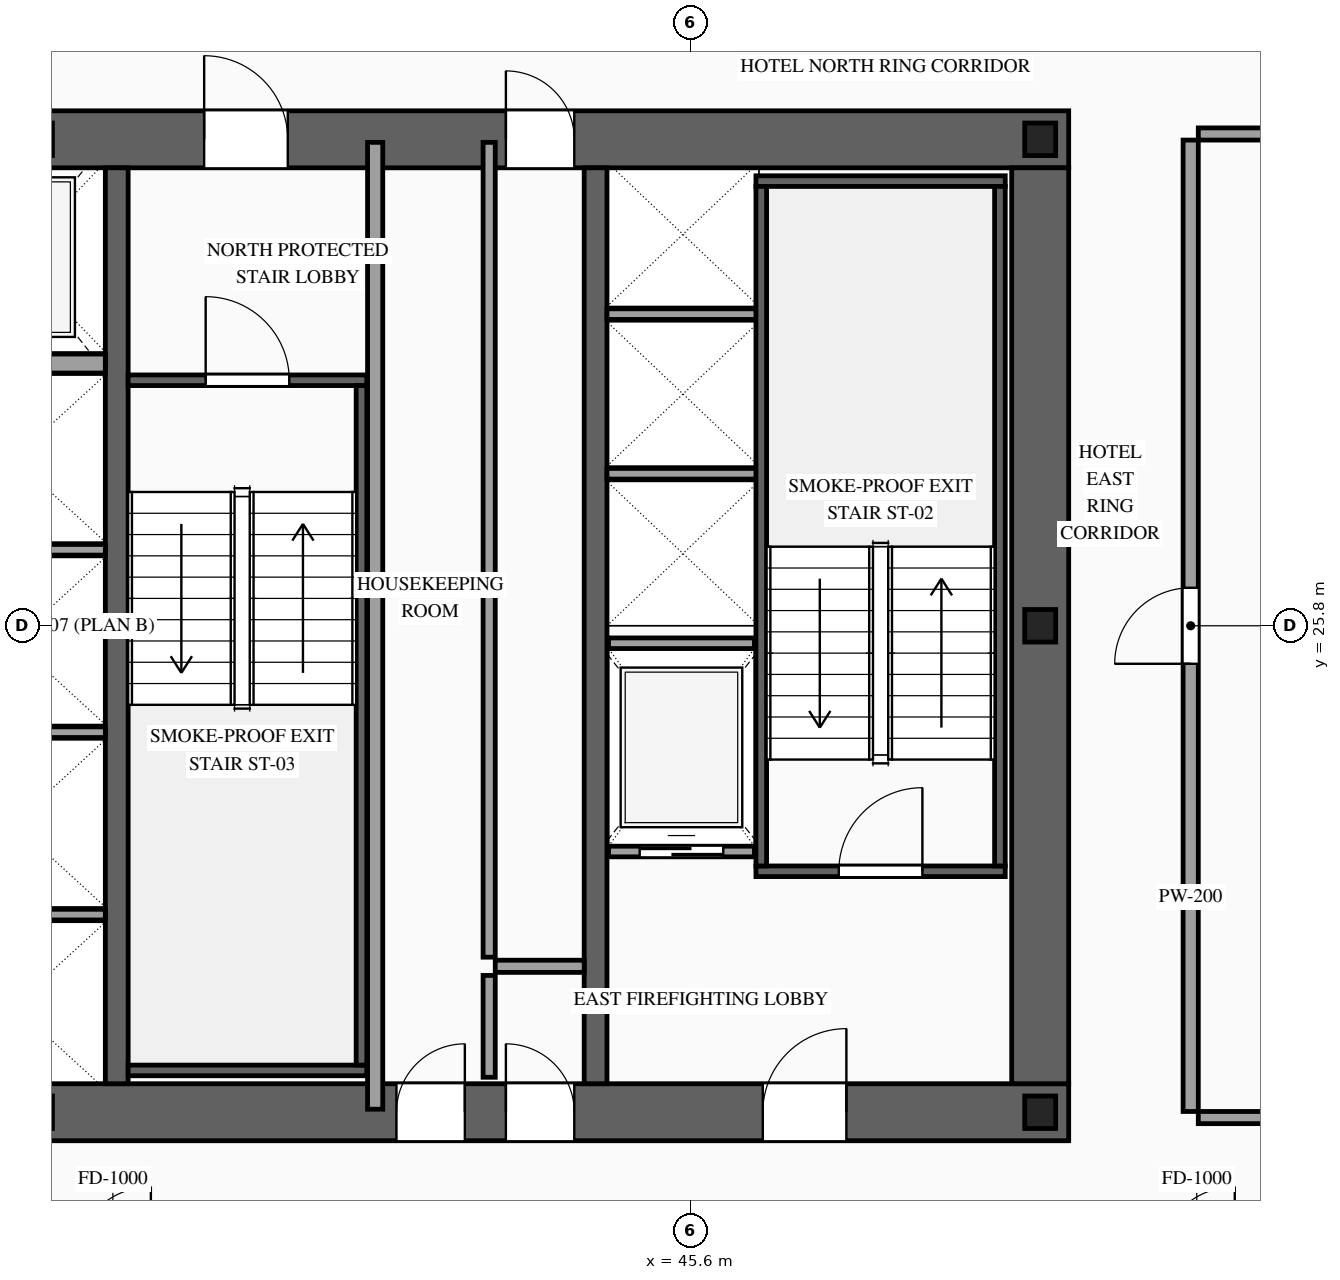
"""IFC4 building model, lengths in metres.
Left out: names, types, materials, properties, quantities, classifications, styles, units other than length and angle.
Written with IfcOpenShell. Run it as: python <this file> out.ifc"""

import sys

from ifc_helpers import new_model, si_unit, direction, frame, frame_2d, origin, origin_2d, place, context, subcontext, project, spatial, rectangle, i_section, extrude, source, transform, mapped, element, fill, save


model = new_model("IFC4")
c1 = context("Model", 3, precision=1e-05, world=origin(), true_north=direction((0.0, 1.0)))
c2 = subcontext(c1, "Body", "Model", "MODEL_VIEW")
j1 = project(units=[si_unit("LENGTHUNIT", "METRE"), si_unit("PLANEANGLEUNIT", "RADIAN")], contexts=[c1])
p1 = place(None, origin())
s1 = spatial("IfcSite", under=j1, at=p1, CompositionType="ELEMENT")
p2 = place(p1, origin())
s2 = spatial("IfcBuilding", under=s1, at=p2, CompositionType="ELEMENT")
p3 = place(p2, frame((0.0, 0.0, 108.2)))
s3 = spatial("IfcBuildingStorey", under=s2, at=p3, CompositionType="ELEMENT", Elevation=108.2)
p4 = place(p3, frame((23.425, 19.4, 0.0), z_axis=(0.0, 0.0, 1.0), x_axis=(1.0, 0.0, 0.0)))
e1 = element("IfcWall", 1, at=p4, inside=s3, PredefinedType="SHEAR", context=c2, shape_type="SweptSolid", body=[
    extrude(rectangle(XDim=27.15, YDim=0.75, at=frame_2d((13.575, 0.0))), origin(), (0.0, 0.0, 1.0), 3.6),
])
p5 = place(p4, frame((2.025, 0.0, 0.0)))
e2 = element("IfcOpeningElement", 2, at=p5, cuts=e1, PredefinedType="OPENING", context=c2, shape_type="SweptSolid", body=[
    extrude(rectangle(XDim=1.1, YDim=2.2, at=frame_2d((0.55, 1.1))), frame((0.0, 0.39, 0.0), z_axis=(0.0, -1.0, 0.0), x_axis=(1.0, 0.0, 0.0)), (0.0, 0.0, 1.0), 0.78),
])
p6 = place(p4, frame((9.925, 0.0, 0.0)))
e3 = element("IfcOpeningElement", 3, at=p6, cuts=e1, PredefinedType="OPENING", context=c2, shape_type="SweptSolid", body=[
    extrude(rectangle(XDim=1.1, YDim=2.2, at=frame_2d((0.55, 1.1))), frame((0.0, 0.39, 0.0), z_axis=(0.0, -1.0, 0.0), x_axis=(1.0, 0.0, 0.0)), (0.0, 0.0, 1.0), 0.78),
])
p7 = place(p4, frame((23.125, 0.0, 0.0)))
e4 = element("IfcOpeningElement", 4, at=p7, cuts=e1, PredefinedType="OPENING", context=c2, shape_type="SweptSolid", body=[
    extrude(rectangle(XDim=1.1, YDim=2.2, at=frame_2d((0.55, 1.1))), frame((0.0, 0.39, 0.0), z_axis=(0.0, -1.0, 0.0), x_axis=(1.0, 0.0, 0.0)), (0.0, 0.0, 1.0), 0.78),
])
p8 = place(p4, frame((19.745, 0.0, 0.0)))
e5 = element("IfcOpeningElement", 5, at=p8, cuts=e1, PredefinedType="OPENING", context=c2, shape_type="SweptSolid", body=[
    extrude(rectangle(XDim=0.9, YDim=2.15, at=frame_2d((0.45, 1.075))), frame((0.0, 0.39, 0.0), z_axis=(0.0, -1.0, 0.0), x_axis=(1.0, 0.0, 0.0)), (0.0, 0.0, 1.0), 0.78),
])
p9 = place(p4, frame((18.305, 0.0, 0.0)))
e6 = element("IfcOpeningElement", 6, at=p9, cuts=e1, PredefinedType="OPENING", context=c2, shape_type="SweptSolid", body=[
    extrude(rectangle(XDim=0.9, YDim=2.15, at=frame_2d((0.45, 1.075))), frame((0.0, 0.39, 0.0), z_axis=(0.0, -1.0, 0.0), x_axis=(1.0, 0.0, 0.0)), (0.0, 0.0, 1.0), 0.78),
])
p10 = place(p3, frame((23.425, 32.2, 0.0), z_axis=(0.0, 0.0, 1.0), x_axis=(1.0, 0.0, 0.0)))
e7 = element("IfcWall", 7, at=p10, inside=s3, PredefinedType="SHEAR", context=c2, shape_type="SweptSolid", body=[
    extrude(rectangle(XDim=27.15, YDim=0.75, at=frame_2d((13.575, 0.0))), origin(), (0.0, 0.0, 1.0), 3.6),
])
p11 = place(p10, frame((4.645, 0.0, 0.0)))
e8 = element("IfcOpeningElement", 8, at=p11, cuts=e7, PredefinedType="OPENING", context=c2, shape_type="SweptSolid", body=[
    extrude(rectangle(XDim=0.9, YDim=2.15, at=frame_2d((0.45, 1.075))), frame((0.0, 0.39, 0.0), z_axis=(0.0, -1.0, 0.0), x_axis=(1.0, 0.0, 0.0)), (0.0, 0.0, 1.0), 0.78),
])
p12 = place(p10, frame((9.925, 0.0, 0.0)))
e9 = element("IfcOpeningElement", 9, at=p12, cuts=e7, PredefinedType="OPENING", context=c2, shape_type="SweptSolid", body=[
    extrude(rectangle(XDim=1.1, YDim=2.2, at=frame_2d((0.55, 1.1))), frame((0.0, 0.39, 0.0), z_axis=(0.0, -1.0, 0.0), x_axis=(1.0, 0.0, 0.0)), (0.0, 0.0, 1.0), 0.78),
])
p13 = place(p10, frame((15.775, 0.0, 0.0)))
e10 = element("IfcOpeningElement", 10, at=p13, cuts=e7, PredefinedType="OPENING", context=c2, shape_type="SweptSolid", body=[
    extrude(rectangle(XDim=1.1, YDim=2.2, at=frame_2d((0.55, 1.1))), frame((0.0, 0.39, 0.0), z_axis=(0.0, -1.0, 0.0), x_axis=(1.0, 0.0, 0.0)), (0.0, 0.0, 1.0), 0.78),
])
p14 = place(p10, frame((19.745, 0.0, 0.0)))
e11 = element("IfcOpeningElement", 11, at=p14, cuts=e7, PredefinedType="OPENING", context=c2, shape_type="SweptSolid", body=[
    extrude(rectangle(XDim=0.9, YDim=2.15, at=frame_2d((0.45, 1.075))), frame((0.0, 0.39, 0.0), z_axis=(0.0, -1.0, 0.0), x_axis=(1.0, 0.0, 0.0)), (0.0, 0.0, 1.0), 0.78),
])
m1 = source(origin(), c2, "Body", "SweptSolid", [
    extrude(rectangle(XDim=12.05, YDim=0.75, at=frame_2d((6.025, 0.0))), origin(), (0.0, 0.0, 1.0), 3.6),
])
p15 = place(p3, frame((50.2, 19.775, 0.0), z_axis=(0.0, 0.0, 1.0), x_axis=(0.0, 1.0, 0.0)))
e12 = element("IfcWall", 12, at=p15, inside=s3, PredefinedType="SHEAR", context=c2, shape_type="MappedRepresentation", body=[
    mapped(m1, transform((0.0, 0.0, 0.0), scale=1.0)),
])
m2 = source(origin(), c2, "Body", "SweptSolid", [
    extrude(rectangle(XDim=12.05, YDim=0.3, at=frame_2d((6.025, 0.0))), origin(), (0.0, 0.0, 1.0), 3.6),
])
for number, where, z_axis, x_axis in (
    (13, (38.05, 19.775, 0.0), (0.0, 0.0, 1.0), (0.0, 1.0, 0.0)),
    (14, (44.35, 19.775, 0.0), (0.0, 0.0, 1.0), (0.0, 1.0, 0.0)),
):
    element("IfcWall", number, at=place(p3, frame(where, z_axis=z_axis, x_axis=x_axis)), inside=s3, PredefinedType="SOLIDWALL", context=c2, shape_type="MappedRepresentation", body=[
        mapped(m2, transform((0.0, 0.0, 0.0), scale=1.0)),
    ])
m3 = source(origin(), c2, "Body", "SweptSolid", [
    extrude(i_section(OverallWidth=0.407, OverallDepth=0.428, WebThickness=0.02, FlangeThickness=0.035, at=origin_2d()), origin(), (0.0, 0.0, 1.0), 3.6),
])
for number, where, z_axis, x_axis in (
    (15, (37.0, 19.4, 0.0), (0.0, 0.0, 1.0), (1.0, 0.0, 0.0)),
    (16, (50.2, 19.4, 0.0), (0.0, 0.0, 1.0), (1.0, 0.0, 0.0)),
    (17, (50.2, 25.8, 0.0), (0.0, 0.0, 1.0), (1.0, 0.0, 0.0)),
    (18, (37.0, 32.2, 0.0), (0.0, 0.0, 1.0), (1.0, 0.0, 0.0)),
    (19, (50.2, 32.2, 0.0), (0.0, 0.0, 1.0), (1.0, 0.0, 0.0)),
):
    element("IfcColumn", number, at=place(p3, frame(where, z_axis=z_axis, x_axis=x_axis)), inside=s3, PredefinedType="COLUMN", context=c2, shape_type="MappedRepresentation", body=[
        mapped(m3, transform((0.0, 0.0, 0.0), scale=1.0)),
    ])
p16 = place(p3, frame((44.52, 22.83, 0.0), z_axis=(0.0, 0.0, 1.0), x_axis=(1.0, 0.0, 0.0)))
e20 = element("IfcWall", 20, at=p16, inside=s3, PredefinedType="SOLIDWALL", context=c2, shape_type="SweptSolid", body=[
    extrude(rectangle(XDim=1.92, YDim=0.14, at=frame_2d((0.96, 0.0))), origin(), (0.0, 0.0, 1.0), 3.38),
])
p17 = place(p16, frame((0.41, 0.0, 0.0)))
e21 = element("IfcOpeningElement", 21, at=p17, cuts=e20, PredefinedType="OPENING", context=c2, shape_type="SweptSolid", body=[
    extrude(rectangle(XDim=1.1, YDim=2.2, at=frame_2d((0.55, 1.1))), frame((0.0, 0.085, 0.0), z_axis=(0.0, -1.0, 0.0), x_axis=(1.0, 0.0, 0.0)), (0.0, 0.0, 1.0), 0.17),
])
m4 = source(origin(), c2, "Body", "SweptSolid", [
    extrude(rectangle(XDim=1.92, YDim=0.14, at=frame_2d((0.96, 0.0))), origin(), (0.0, 0.0, 1.0), 3.38),
])
p18 = place(p3, frame((44.52, 25.57, 0.0), z_axis=(0.0, 0.0, 1.0), x_axis=(1.0, 0.0, 0.0)))
e22 = element("IfcWall", 22, at=p18, inside=s3, PredefinedType="SOLIDWALL", context=c2, shape_type="MappedRepresentation", body=[
    mapped(m4, transform((0.0, 0.0, 0.0), scale=1.0)),
])
m5 = source(origin(), c2, "Body", "SweptSolid", [
    extrude(rectangle(XDim=2.4, YDim=0.14, at=frame_2d((1.2, 0.0))), origin(), (0.0, 0.0, 1.0), 3.38),
])
for number, where, z_axis, x_axis in (
    (23, (35.5, 22.0, 0.0), (0.0, 0.0, 1.0), (1.0, 0.0, 0.0)),
    (24, (35.5, 24.4, 0.0), (0.0, 0.0, 1.0), (1.0, 0.0, 0.0)),
    (25, (35.5, 26.8, 0.0), (0.0, 0.0, 1.0), (1.0, 0.0, 0.0)),
):
    element("IfcWall", number, at=place(p3, frame(where, z_axis=z_axis, x_axis=x_axis)), inside=s3, PredefinedType="SOLIDWALL", context=c2, shape_type="MappedRepresentation", body=[
        mapped(m5, transform((0.0, 0.0, 0.0), scale=1.0)),
    ])
m6 = source(origin(), c2, "Body", "SweptSolid", [
    extrude(rectangle(XDim=2.4, YDim=0.25, at=frame_2d((1.2, 0.0))), origin(), (0.0, 0.0, 1.0), 3.38),
])
p19 = place(p3, frame((35.5, 29.25, 0.0), z_axis=(0.0, 0.0, 1.0), x_axis=(1.0, 0.0, 0.0)))
e26 = element("IfcWall", 26, at=p19, inside=s3, PredefinedType="SOLIDWALL", context=c2, shape_type="MappedRepresentation", body=[
    mapped(m6, transform((0.0, 0.0, 0.0), scale=1.0)),
])
m7 = source(origin(), c2, "Body", "SweptSolid", [
    extrude(rectangle(XDim=2.0, YDim=0.14, at=frame_2d((1.0, 0.0))), origin(), (0.0, 0.0, 1.0), 3.38),
])
for number, where, z_axis, x_axis in (
    (27, (44.5, 27.8, 0.0), (0.0, 0.0, 1.0), (1.0, 0.0, 0.0)),
    (28, (44.5, 29.9, 0.0), (0.0, 0.0, 1.0), (1.0, 0.0, 0.0)),
):
    element("IfcWall", number, at=place(p3, frame(where, z_axis=z_axis, x_axis=x_axis)), inside=s3, PredefinedType="SOLIDWALL", context=c2, shape_type="MappedRepresentation", body=[
        mapped(m7, transform((0.0, 0.0, 0.0), scale=1.0)),
    ])
p20 = place(p3, frame((46.46, 22.57, 0.0), z_axis=(0.0, 0.0, 1.0), x_axis=(1.0, 0.0, 0.0)))
e29 = element("IfcWall", 29, at=p20, inside=s3, PredefinedType="SOLIDWALL", context=c2, shape_type="SweptSolid", body=[
    extrude(rectangle(XDim=3.28, YDim=0.14, at=frame_2d((1.64, 0.0))), origin(), (0.0, 0.0, 1.0), 3.38),
])
p21 = place(p20, frame((1.09, 0.0, 0.0)))
e30 = element("IfcOpeningElement", 30, at=p21, cuts=e29, PredefinedType="OPENING", context=c2, shape_type="SweptSolid", body=[
    extrude(rectangle(XDim=1.1, YDim=2.2, at=frame_2d((0.55, 1.1))), frame((0.0, 0.085, 0.0), z_axis=(0.0, -1.0, 0.0), x_axis=(1.0, 0.0, 0.0)), (0.0, 0.0, 1.0), 0.17),
])
m8 = source(origin(), c2, "Body", "SweptSolid", [
    extrude(rectangle(XDim=3.28, YDim=0.14, at=frame_2d((1.64, 0.0))), origin(), (0.0, 0.0, 1.0), 3.38),
])
p22 = place(p3, frame((46.46, 31.65, 0.0), z_axis=(0.0, 0.0, 1.0), x_axis=(1.0, 0.0, 0.0)))
e31 = element("IfcWall", 31, at=p22, inside=s3, PredefinedType="SOLIDWALL", context=c2, shape_type="MappedRepresentation", body=[
    mapped(m8, transform((0.0, 0.0, 0.0), scale=1.0)),
])
m9 = source(origin(), c2, "Body", "SweptSolid", [
    extrude(rectangle(XDim=8.94, YDim=0.14, at=frame_2d((4.47, 0.0))), origin(), (0.0, 0.0, 1.0), 3.38),
])
for number, where, z_axis, x_axis in (
    (32, (46.53, 22.64, 0.0), (0.0, 0.0, 1.0), (0.0, 1.0, 0.0)),
    (33, (49.67, 22.64, 0.0), (0.0, 0.0, 1.0), (0.0, 1.0, 0.0)),
):
    element("IfcWall", number, at=place(p3, frame(where, z_axis=z_axis, x_axis=x_axis)), inside=s3, PredefinedType="SOLIDWALL", context=c2, shape_type="MappedRepresentation", body=[
        mapped(m9, transform((0.0, 0.0, 0.0), scale=1.0)),
    ])
p23 = place(p3, frame((38.2, 29.03, 0.0), z_axis=(0.0, 0.0, 1.0), x_axis=(1.0, 0.0, 0.0)))
e34 = element("IfcWall", 34, at=p23, inside=s3, PredefinedType="SOLIDWALL", context=c2, shape_type="SweptSolid", body=[
    extrude(rectangle(XDim=3.14, YDim=0.14, at=frame_2d((1.57, 0.0))), origin(), (0.0, 0.0, 1.0), 3.38),
])
p24 = place(p23, frame((1.02, 0.0, 0.0)))
e35 = element("IfcOpeningElement", 35, at=p24, cuts=e34, PredefinedType="OPENING", context=c2, shape_type="SweptSolid", body=[
    extrude(rectangle(XDim=1.1, YDim=2.2, at=frame_2d((0.55, 1.1))), frame((0.0, 0.085, 0.0), z_axis=(0.0, -1.0, 0.0), x_axis=(1.0, 0.0, 0.0)), (0.0, 0.0, 1.0), 0.17),
])
m10 = source(origin(), c2, "Body", "SweptSolid", [
    extrude(rectangle(XDim=3.14, YDim=0.14, at=frame_2d((1.57, 0.0))), origin(), (0.0, 0.0, 1.0), 3.38),
])
p25 = place(p3, frame((38.2, 19.95, 0.0), z_axis=(0.0, 0.0, 1.0), x_axis=(1.0, 0.0, 0.0)))
e36 = element("IfcWall", 36, at=p25, inside=s3, PredefinedType="SOLIDWALL", context=c2, shape_type="MappedRepresentation", body=[
    mapped(m10, transform((0.0, 0.0, 0.0), scale=1.0)),
])
m11 = source(origin(), c2, "Body", "SweptSolid", [
    extrude(rectangle(XDim=8.94, YDim=0.14, at=frame_2d((4.47, 0.0))), origin(), (0.0, 0.0, 1.0), 3.38),
])
p26 = place(p3, frame((41.27, 20.02, 0.0), z_axis=(0.0, 0.0, 1.0), x_axis=(0.0, 1.0, 0.0)))
e37 = element("IfcWall", 37, at=p26, inside=s3, PredefinedType="SOLIDWALL", context=c2, shape_type="MappedRepresentation", body=[
    mapped(m11, transform((0.0, 0.0, 0.0), scale=1.0)),
])
m12 = source(origin(), c2, "Body", "SweptSolid", [
    extrude(rectangle(XDim=1.34, YDim=0.16, at=frame_2d((0.67, 0.0))), origin(), (0.0, 0.0, 1.0), 3.38),
])
p27 = place(p3, frame((42.95, 19.86, 0.0), z_axis=(0.0, 0.0, 1.0), x_axis=(0.0, 1.0, 0.0)))
e38 = element("IfcWall", 38, at=p27, inside=s3, PredefinedType="PARTITIONING", context=c2, shape_type="MappedRepresentation", body=[
    mapped(m12, transform((0.0, 0.0, 0.0), scale=1.0)),
])
m13 = source(origin(), c2, "Body", "SweptSolid", [
    extrude(rectangle(XDim=1.17, YDim=0.16, at=frame_2d((0.585, 0.0))), origin(), (0.0, 0.0, 1.0), 3.38),
])
p28 = place(p3, frame((43.03, 21.32, 0.0), z_axis=(0.0, 0.0, 1.0), x_axis=(1.0, 0.0, 0.0)))
e39 = element("IfcWall", 39, at=p28, inside=s3, PredefinedType="PARTITIONING", context=c2, shape_type="MappedRepresentation", body=[
    mapped(m13, transform((0.0, 0.0, 0.0), scale=1.0)),
])
m14 = source(origin(), c2, "Body", "SweptSolid", [
    extrude(rectangle(XDim=12.72, YDim=0.2, at=frame_2d((6.36, 0.0))), origin(), (0.0, 0.0, 1.0), 3.38),
])
p29 = place(p3, frame((41.45, 19.44, 0.0), z_axis=(0.0, 0.0, 1.0), x_axis=(0.0, 1.0, 0.0)))
e40 = element("IfcWall", 40, at=p29, inside=s3, PredefinedType="PARTITIONING", context=c2, shape_type="MappedRepresentation", body=[
    mapped(m14, transform((0.0, 0.0, 0.0), scale=1.0)),
])
m15 = source(origin(), c2, "Body", "SweptSolid", [
    extrude(rectangle(XDim=10.72, YDim=0.16, at=frame_2d((5.36, 0.0))), origin(), (0.0, 0.0, 1.0), 3.38),
])
p30 = place(p3, frame((42.95, 21.44, 0.0), z_axis=(0.0, 0.0, 1.0), x_axis=(0.0, 1.0, 0.0)))
e41 = element("IfcWall", 41, at=p30, inside=s3, PredefinedType="PARTITIONING", context=c2, shape_type="MappedRepresentation", body=[
    mapped(m15, transform((0.0, 0.0, 0.0), scale=1.0)),
])
p31 = place(p3, frame((52.18, 19.41, 0.0), z_axis=(0.0, 0.0, 1.0), x_axis=(0.0, 1.0, 0.0)))
e42 = element("IfcWall", 42, at=p31, inside=s3, PredefinedType="PARTITIONING", context=c2, shape_type="SweptSolid", body=[
    extrude(rectangle(XDim=12.78, YDim=0.2, at=frame_2d((6.39, 0.0))), origin(), (0.0, 0.0, 1.0), 3.38),
])
p32 = place(p31, frame((5.89, 0.0, 0.0)))
e43 = element("IfcOpeningElement", 43, at=p32, cuts=e42, PredefinedType="OPENING", context=c2, shape_type="SweptSolid", body=[
    extrude(rectangle(XDim=1.0, YDim=2.2, at=frame_2d((0.5, 1.1))), frame((0.0, 0.115, 0.0), z_axis=(0.0, -1.0, 0.0), x_axis=(1.0, 0.0, 0.0)), (0.0, 0.0, 1.0), 0.23),
])
m16 = source(origin(), c2, "Body", "SweptSolid", [
    extrude(rectangle(XDim=8.17, YDim=0.16, at=frame_2d((4.085, 0.0))), origin(), (0.0, 0.0, 1.0), 2.875),
])
for number, where, z_axis, x_axis in (
    (44, (52.28, 19.33, 0.0), (0.0, 0.0, 1.0), (1.0, 0.0, 0.0)),
    (45, (52.28, 32.27, 0.0), (0.0, 0.0, 1.0), (1.0, 0.0, 0.0)),
):
    element("IfcWall", number, at=place(p3, frame(where, z_axis=z_axis, x_axis=x_axis)), inside=s3, PredefinedType="PARTITIONING", context=c2, shape_type="MappedRepresentation", body=[
        mapped(m16, transform((0.0, 0.0, 0.0), scale=1.0)),
    ])
m17 = source(origin(), c2, "Body", "SweptSolid", [
    extrude(rectangle(XDim=1.1, YDim=2.2, at=frame_2d((0.55, 1.1))), frame((0.0, 0.025, 0.0), z_axis=(0.0, -1.0, 0.0), x_axis=(1.0, 0.0, 0.0)), (0.0, 0.0, 1.0), 0.05),
])
p33 = place(p17, origin())
e46 = element("IfcDoor", 46, at=p33, inside=s3, OperationType="SLIDING_TO_RIGHT", PredefinedType="DOOR", context=c2, shape_type="MappedRepresentation", body=[
    mapped(m17, transform((0.0, 0.0, 0.0), scale=1.0)),
])
fill(e21, e46)
m18 = source(origin(), c2, "Body", "SweptSolid", [
    extrude(rectangle(XDim=1.1, YDim=2.2, at=frame_2d((0.55, 1.1))), frame((0.0, 0.025, 0.0), z_axis=(0.0, -1.0, 0.0), x_axis=(1.0, 0.0, 0.0)), (0.0, 0.0, 1.0), 0.05),
])
p34 = place(p21, origin())
e47 = element("IfcDoor", 47, at=p34, inside=s3, OperationType="SINGLE_SWING_RIGHT", PredefinedType="DOOR", context=c2, shape_type="MappedRepresentation", body=[
    mapped(m18, transform((0.0, 0.0, 0.0), scale=1.0)),
])
fill(e30, e47)
p35 = place(p24, origin())
e48 = element("IfcDoor", 48, at=p35, inside=s3, OperationType="SINGLE_SWING_LEFT", PredefinedType="DOOR", context=c2, shape_type="MappedRepresentation", body=[
    mapped(m18, transform((0.0, 0.0, 0.0), scale=1.0)),
])
fill(e35, e48)
p36 = place(p7, origin())
e49 = element("IfcDoor", 49, at=p36, inside=s3, OperationType="SINGLE_SWING_RIGHT", PredefinedType="DOOR", context=c2, shape_type="MappedRepresentation", body=[
    mapped(m18, transform((0.0, 0.0, 0.0), scale=1.0)),
])
fill(e4, e49)
p37 = place(p13, origin())
e50 = element("IfcDoor", 50, at=p37, inside=s3, OperationType="SINGLE_SWING_LEFT", PredefinedType="DOOR", context=c2, shape_type="MappedRepresentation", body=[
    mapped(m18, transform((0.0, 0.0, 0.0), scale=1.0)),
])
fill(e10, e50)
m19 = source(origin(), c2, "Body", "SweptSolid", [
    extrude(rectangle(XDim=0.9, YDim=2.15, at=frame_2d((0.45, 1.075))), frame((0.0, 0.025, 0.0), z_axis=(0.0, -1.0, 0.0), x_axis=(1.0, 0.0, 0.0)), (0.0, 0.0, 1.0), 0.05),
])
p38 = place(p8, origin())
e51 = element("IfcDoor", 51, at=p38, inside=s3, OperationType="SINGLE_SWING_LEFT", PredefinedType="DOOR", context=c2, shape_type="MappedRepresentation", body=[
    mapped(m19, transform((0.0, 0.0, 0.0), scale=1.0)),
])
fill(e5, e51)
p39 = place(p9, origin())
e52 = element("IfcDoor", 52, at=p39, inside=s3, OperationType="SINGLE_SWING_RIGHT", PredefinedType="DOOR", context=c2, shape_type="MappedRepresentation", body=[
    mapped(m19, transform((0.0, 0.0, 0.0), scale=1.0)),
])
fill(e6, e52)
p40 = place(p14, origin())
e53 = element("IfcDoor", 53, at=p40, inside=s3, OperationType="SINGLE_SWING_LEFT", PredefinedType="DOOR", context=c2, shape_type="MappedRepresentation", body=[
    mapped(m19, transform((0.0, 0.0, 0.0), scale=1.0)),
])
fill(e11, e53)
m20 = source(origin(), c2, "Body", "SweptSolid", [
    extrude(rectangle(XDim=1.0, YDim=2.2, at=frame_2d((0.5, 1.1))), frame((0.0, 0.025, 0.0), z_axis=(0.0, -1.0, 0.0), x_axis=(1.0, 0.0, 0.0)), (0.0, 0.0, 1.0), 0.05),
])
p41 = place(p32, origin())
e54 = element("IfcDoor", 54, at=p41, inside=s3, OperationType="SINGLE_SWING_LEFT", PredefinedType="DOOR", context=c2, shape_type="MappedRepresentation", body=[
    mapped(m20, transform((0.0, 0.0, 0.0), scale=1.0)),
])
fill(e43, e54)
save(model, sys.argv[1])
